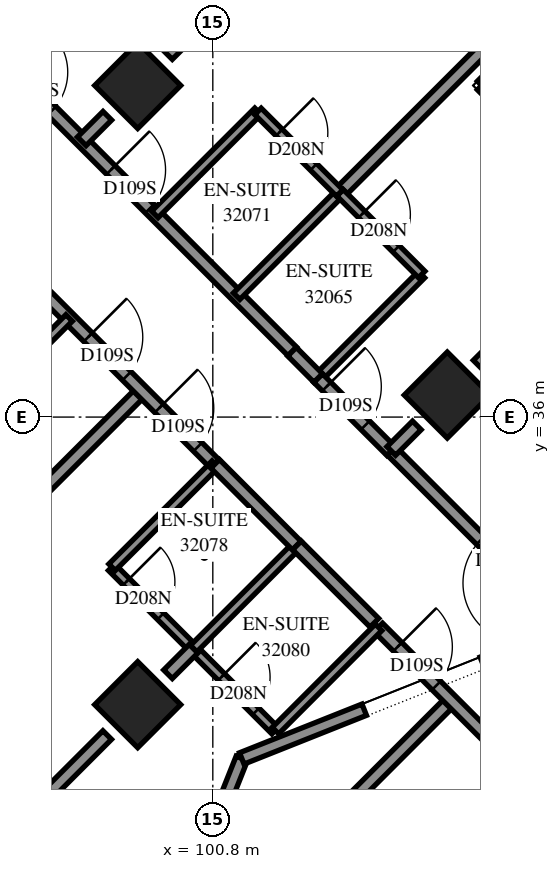
"""IFC4 building model, lengths in metres.
Left out: names, types, materials, properties, quantities, classifications, styles, units other than length and angle.
Written with IfcOpenShell. Run it as: python <this file> out.ifc"""

import sys

from ifc_helpers import new_model, si_unit, direction, frame, frame_2d, origin, origin_2d, place, context, subcontext, project, spatial, polyline, rectangle, outline, extrude, element, fill, save


model = new_model("IFC4")
c1 = context("Model", 3, precision=1e-05, world=origin(), true_north=direction((0.0, 1.0)))
c2 = subcontext(c1, "Body", "Model", "MODEL_VIEW")
j1 = project(units=[si_unit("LENGTHUNIT", "METRE"), si_unit("PLANEANGLEUNIT", "RADIAN")], contexts=[c1])
p1 = place(None, origin())
s1 = spatial("IfcSite", under=j1, at=p1, CompositionType="ELEMENT")
p2 = place(p1, origin())
s2 = spatial("IfcBuilding", under=s1, at=p2, CompositionType="ELEMENT")
p3 = place(p2, frame((0.0, 0.0, 118.6)))
s3 = spatial("IfcBuildingStorey", under=s2, at=p3, CompositionType="ELEMENT", Elevation=118.6)
for number, where, z_axis, x_axis in (
    (1, (99.565, 41.453, 0.0), (0.0, 0.0, 1.0), (0.707, -0.707, 0.0)),
    (2, (104.656, 36.362, 0.0), (0.0, 0.0, 1.0), (0.707, -0.707, 0.0)),
    (3, (99.565, 31.271, 0.0), (0.0, 0.0, 1.0), (0.707, -0.707, 0.0)),
):
    element("IfcColumn", number, at=place(p3, frame(where, z_axis=z_axis, x_axis=x_axis)), inside=s3, PredefinedType="COLUMN", context=c2, shape_type="SweptSolid", body=[
        extrude(rectangle(XDim=1.0, YDim=1.0, at=origin_2d()), origin(), (0.0, 0.0, 1.0), 3.1),
    ])
p4 = place(p3, frame((108.379, 44.61, 0.0), z_axis=(0.0, 0.0, 1.0), x_axis=(-0.7071179789, -0.7070955833, 0.0)))
e4 = element("IfcWall", 4, at=p4, inside=s3, PredefinedType="PARAPET", context=c2, shape_type="SweptSolid", body=[
    extrude(outline(polyline([(0.0, -0.1), (4.565, -0.1), (4.365, 0.1), (0.0, 0.1), (0.0, -0.1)])), origin(), (0.0, 0.0, 1.0), 0.25),
])
p5 = place(p3, frame((105.222, 41.453, 0.0), z_axis=(0.0, 0.0, 1.0), x_axis=(0.7071067812, -0.7071067812, 0.0)))
e5 = element("IfcWall", 5, at=p5, inside=s3, PredefinedType="PARAPET", context=c2, shape_type="SweptSolid", body=[
    extrude(outline(polyline([(-0.1, -0.1), (4.59, -0.1), (4.718, 0.1), (0.1, 0.1), (-0.1, -0.1)])), origin(), (0.0, 0.0, 1.0), 0.25),
])
p6 = place(p3, frame((101.276, 30.386, 0.0), z_axis=(0.0, 0.0, 1.0), x_axis=(-0.3696934536, -0.9291537819, 0.0)))
e6 = element("IfcWall", 6, at=p6, inside=s3, PredefinedType="PARAPET", context=c2, shape_type="SweptSolid", body=[
    extrude(outline(polyline([(-0.043, -0.1), (5.524, -0.1), (5.614, 0.1), (0.043, 0.1), (-0.043, -0.1)])), origin(), (0.0, 0.0, 1.0), 0.25),
])
p7 = place(p3, frame((96.465, 23.082, 0.0), z_axis=(0.0, 0.0, 1.0), x_axis=(0.707016895, 0.7071966559, 0.0)))
e7 = element("IfcWall", 7, at=p7, inside=s3, PredefinedType="PARTITIONING", context=c2, shape_type="SweptSolid", body=[
    extrude(rectangle(XDim=11.682, YDim=0.2, at=frame_2d((5.841, 0.0))), origin(), (0.0, 0.0, 1.0), 3.1),
])
p8 = place(p3, frame((91.45, 28.248, 0.0), z_axis=(0.0, 0.0, 1.0), x_axis=(0.7071931644, 0.7070203875, 0.0)))
e8 = element("IfcWall", 8, at=p8, inside=s3, PredefinedType="PARTITIONING", context=c2, shape_type="SweptSolid", body=[
    extrude(rectangle(XDim=11.576, YDim=0.2, at=frame_2d((5.788, 0.0))), origin(), (0.0, 0.0, 1.0), 3.1),
])
p9 = place(p3, frame((94.047, 42.015, 0.0), z_axis=(0.0, 0.0, 1.0), x_axis=(0.7071067812, -0.7071067812, 0.0)))
e9 = element("IfcWall", 9, at=p9, inside=s3, PredefinedType="PARTITIONING", context=c2, shape_type="SweptSolid", body=[
    extrude(rectangle(XDim=9.6, YDim=0.2, at=frame_2d((4.8, 0.0))), origin(), (0.0, 0.0, 1.0), 3.1),
])
p10 = place(p9, frame((1.099, 0.0, 0.0)))
e10 = element("IfcOpeningElement", 10, at=p10, cuts=e9, PredefinedType="OPENING", context=c2, shape_type="SweptSolid", body=[
    extrude(rectangle(XDim=0.9, YDim=2.1, at=frame_2d((0.45, 1.05))), frame((0.0, 0.11, 0.0), z_axis=(0.0, -1.0, 0.0), x_axis=(1.0, 0.0, 0.0)), (0.0, 0.0, 1.0), 0.22),
])
p11 = place(p9, frame((6.649, 0.0, 0.0)))
e11 = element("IfcOpeningElement", 11, at=p11, cuts=e9, PredefinedType="OPENING", context=c2, shape_type="SweptSolid", body=[
    extrude(rectangle(XDim=0.9, YDim=2.1, at=frame_2d((0.45, 1.05))), frame((0.0, 0.11, 0.0), z_axis=(0.0, -1.0, 0.0), x_axis=(1.0, 0.0, 0.0)), (0.0, 0.0, 1.0), 0.22),
])
p12 = place(p9, frame((8.3, 0.0, 0.0)))
e12 = element("IfcOpeningElement", 12, at=p12, cuts=e9, PredefinedType="OPENING", context=c2, shape_type="SweptSolid", body=[
    extrude(rectangle(XDim=0.9, YDim=2.1, at=frame_2d((0.45, 1.05))), frame((0.0, 0.11, 0.0), z_axis=(0.0, -1.0, 0.0), x_axis=(1.0, 0.0, 0.0)), (0.0, 0.0, 1.0), 0.22),
])
p13 = place(p3, frame((96.103, 43.083, 0.0), z_axis=(0.0, 0.0, 1.0), x_axis=(0.7071067812, -0.7071067812, 0.0)))
e13 = element("IfcWall", 13, at=p13, inside=s3, PredefinedType="PARTITIONING", context=c2, shape_type="SweptSolid", body=[
    extrude(rectangle(XDim=8.491, YDim=0.2, at=frame_2d((4.245, 0.0))), origin(), (0.0, 0.0, 1.0), 3.1),
])
p14 = place(p13, frame((1.995, 0.0, 0.0)))
e14 = element("IfcOpeningElement", 14, at=p14, cuts=e13, PredefinedType="OPENING", context=c2, shape_type="SweptSolid", body=[
    extrude(rectangle(XDim=0.9, YDim=2.1, at=frame_2d((0.45, 1.05))), frame((0.0, 0.11, 0.0), z_axis=(0.0, -1.0, 0.0), x_axis=(1.0, 0.0, 0.0)), (0.0, 0.0, 1.0), 0.22),
])
p15 = place(p13, frame((4.27, 0.0, 0.0)))
e15 = element("IfcOpeningElement", 15, at=p15, cuts=e13, PredefinedType="OPENING", context=c2, shape_type="SweptSolid", body=[
    extrude(rectangle(XDim=0.9, YDim=2.1, at=frame_2d((0.45, 1.05))), frame((0.0, 0.11, 0.0), z_axis=(0.0, -1.0, 0.0), x_axis=(1.0, 0.0, 0.0)), (0.0, 0.0, 1.0), 0.22),
])
p16 = place(p3, frame((102.887, 39.687, 0.0), z_axis=(0.0, 0.0, 1.0), x_axis=(0.707250564, 0.7069629691, 0.0)))
e16 = element("IfcWall", 16, at=p16, inside=s3, PredefinedType="PARTITIONING", context=c2, shape_type="SweptSolid", body=[
    extrude(rectangle(XDim=7.302, YDim=0.2, at=frame_2d((3.651, 0.0))), origin(), (0.0, 0.0, 1.0), 3.1),
])
p17 = place(p3, frame((108.831, 30.355, 0.0), z_axis=(0.0, 0.0, 1.0), x_axis=(-0.7073012053, 0.7069123036, 0.0)))
e17 = element("IfcWall", 17, at=p17, inside=s3, PredefinedType="PARTITIONING", context=c2, shape_type="SweptSolid", body=[
    extrude(rectangle(XDim=7.2, YDim=0.2, at=frame_2d((3.6, 0.0))), origin(), (0.0, 0.0, 1.0), 3.1),
])
p18 = place(p17, frame((4.125, 0.0, 0.0)))
e18 = element("IfcOpeningElement", 18, at=p18, cuts=e17, PredefinedType="OPENING", context=c2, shape_type="SweptSolid", body=[
    extrude(rectangle(XDim=1.0, YDim=2.1, at=frame_2d((0.5, 1.05))), frame((0.0, 0.11, 0.0), z_axis=(0.0, -1.0, 0.0), x_axis=(1.0, 0.0, 0.0)), (0.0, 0.0, 1.0), 0.22),
])
p19 = place(p17, frame((0.705, 0.0, 0.0)))
e19 = element("IfcOpeningElement", 19, at=p19, cuts=e17, PredefinedType="OPENING", context=c2, shape_type="SweptSolid", body=[
    extrude(rectangle(XDim=0.9, YDim=2.1, at=frame_2d((0.45, 1.05))), frame((0.0, 0.11, 0.0), z_axis=(0.0, -1.0, 0.0), x_axis=(1.0, 0.0, 0.0)), (0.0, 0.0, 1.0), 0.22),
])
for number, where, z_axis, x_axis in (
    (20, (105.155, 36.863, 0.0), (0.0, 0.0, 1.0), (0.707, 0.707, 0.0)),
    (21, (100.063, 41.953, 0.0), (0.0, 0.0, 1.0), (0.707, 0.707, 0.0)),
):
    element("IfcWall", number, at=place(p3, frame(where, z_axis=z_axis, x_axis=x_axis)), inside=s3, PredefinedType="PARTITIONING", context=c2, shape_type="SweptSolid", body=[
        extrude(rectangle(XDim=5.787, YDim=0.2, at=frame_2d((2.893, 0.0))), origin(), (0.0, 0.0, 1.0), 3.1),
    ])
p20 = place(p3, frame((94.973, 26.681, 0.0), z_axis=(0.0, 0.0, 1.0), x_axis=(0.7071067812, 0.7071067812, 0.0)))
e22 = element("IfcWall", 22, at=p20, inside=s3, PredefinedType="PARTITIONING", context=c2, shape_type="SweptSolid", body=[
    extrude(rectangle(XDim=5.784, YDim=0.2, at=frame_2d((2.892, 0.0))), origin(), (0.0, 0.0, 1.0), 2.6),
])
p21 = place(p3, frame((103.521, 32.541, 0.0), z_axis=(0.0, 0.0, 1.0), x_axis=(0.7071067812, -0.7071067812, 0.0)))
e23 = element("IfcWall", 23, at=p21, inside=s3, PredefinedType="PARTITIONING", context=c2, shape_type="SweptSolid", body=[
    extrude(rectangle(XDim=5.301, YDim=0.2, at=frame_2d((2.65, 0.0))), origin(), (0.0, 0.0, 1.0), 3.1),
])
p22 = place(p21, frame((0.451, 0.0, 0.0)))
e24 = element("IfcOpeningElement", 24, at=p22, cuts=e23, PredefinedType="OPENING", context=c2, shape_type="SweptSolid", body=[
    extrude(rectangle(XDim=0.9, YDim=2.1, at=frame_2d((0.45, 1.05))), frame((0.0, 0.11, 0.0), z_axis=(0.0, -1.0, 0.0), x_axis=(1.0, 0.0, 0.0)), (0.0, 0.0, 1.0), 0.22),
])
p23 = place(p3, frame((99.137, 33.531, 0.0), z_axis=(0.0, 0.0, 1.0), x_axis=(0.7071067812, -0.7071067812, 0.0)))
e25 = element("IfcWall", 25, at=p23, inside=s3, PredefinedType="PARTITIONING", context=c2, shape_type="SweptSolid", body=[
    extrude(rectangle(XDim=3.801, YDim=0.15, at=frame_2d((1.901, 0.0))), origin(), (0.0, 0.0, 1.0), 3.1),
])
p24 = place(p23, frame((0.339, 0.0, 0.0)))
e26 = element("IfcOpeningElement", 26, at=p24, cuts=e25, PredefinedType="OPENING", context=c2, shape_type="SweptSolid", body=[
    extrude(rectangle(XDim=0.8, YDim=2.1, at=frame_2d((0.4, 1.05))), frame((0.0, 0.085, 0.0), z_axis=(0.0, -1.0, 0.0), x_axis=(1.0, 0.0, 0.0)), (0.0, 0.0, 1.0), 0.17),
])
p25 = place(p23, frame((2.553, 0.0, 0.0)))
e27 = element("IfcOpeningElement", 27, at=p25, cuts=e25, PredefinedType="OPENING", context=c2, shape_type="SweptSolid", body=[
    extrude(rectangle(XDim=0.8, YDim=2.1, at=frame_2d((0.4, 1.05))), frame((0.0, 0.085, 0.0), z_axis=(0.0, -1.0, 0.0), x_axis=(1.0, 0.0, 0.0)), (0.0, 0.0, 1.0), 0.17),
])
p26 = place(p3, frame((102.533, 36.645, 0.0), z_axis=(0.0, 0.0, 1.0), x_axis=(0.7071067812, 0.7071067812, 0.0)))
e28 = element("IfcWall", 28, at=p26, inside=s3, PredefinedType="PARTITIONING", context=c2, shape_type="SweptSolid", body=[
    extrude(rectangle(XDim=2.401, YDim=0.15, at=frame_2d((1.201, 0.0))), origin(), (0.0, 0.0, 1.0), 3.1),
])
for number, where, z_axis, x_axis in (
    (29, (101.192, 37.988, 0.0), (0.0, 0.0, 1.0), (0.707, 0.708, 0.0)),
    (30, (96.739, 35.935, 0.0), (0.0, 0.0, 1.0), (0.708, 0.707, 0.0)),
    (31, (99.143, 33.531, 0.0), (0.0, 0.0, 1.0), (0.708, 0.707, 0.0)),
    (32, (101.83, 30.844, 0.0), (0.0, 0.0, 1.0), (0.707, 0.708, 0.0)),
):
    element("IfcWall", number, at=place(p3, frame(where, z_axis=z_axis, x_axis=x_axis)), inside=s3, PredefinedType="PARTITIONING", context=c2, shape_type="SweptSolid", body=[
        extrude(rectangle(XDim=2.4, YDim=0.15, at=frame_2d((1.2, 0.0))), origin(), (0.0, 0.0, 1.0), 3.1),
    ])
p27 = place(p3, frame((97.443, 41.737, 0.0), z_axis=(0.0, 0.0, 1.0), x_axis=(0.7071067812, 0.7071067812, 0.0)))
e33 = element("IfcWall", 33, at=p27, inside=s3, PredefinedType="PARTITIONING", context=c2, shape_type="SweptSolid", body=[
    extrude(rectangle(XDim=2.398, YDim=0.15, at=frame_2d((1.199, 0.0))), origin(), (0.0, 0.0, 1.0), 3.1),
])
p28 = place(p3, frame((100.483, 32.191, 0.0), z_axis=(0.0, 0.0, 1.0), x_axis=(0.7071067812, 0.7071067812, 0.0)))
e34 = element("IfcWall", 34, at=p28, inside=s3, PredefinedType="PARTITIONING", context=c2, shape_type="SweptSolid", body=[
    extrude(rectangle(XDim=2.398, YDim=0.15, at=frame_2d((1.199, 0.0))), origin(), (0.0, 0.0, 1.0), 2.6),
])
p29 = place(p3, frame((99.847, 39.333, 0.0), z_axis=(0.0, 0.0, 1.0), x_axis=(0.7071067812, 0.7071067812, 0.0)))
e35 = element("IfcWall", 35, at=p29, inside=s3, PredefinedType="PARTITIONING", context=c2, shape_type="SweptSolid", body=[
    extrude(rectangle(XDim=2.398, YDim=0.15, at=frame_2d((1.199, 0.0))), origin(), (0.0, 0.0, 1.0), 3.1),
])
p30 = place(p3, frame((102.891, 39.69, 0.0), z_axis=(0.0, 0.0, 1.0), x_axis=(0.7071067812, -0.7071067812, 0.0)))
e36 = element("IfcWall", 36, at=p30, inside=s3, PredefinedType="PARTITIONING", context=c2, shape_type="SweptSolid", body=[
    extrude(rectangle(XDim=1.901, YDim=0.15, at=frame_2d((0.95, 0.0))), origin(), (0.0, 0.0, 1.0), 3.1),
])
p31 = place(p30, frame((0.505, 0.0, 0.0)))
e37 = element("IfcOpeningElement", 37, at=p31, cuts=e36, PredefinedType="OPENING", context=c2, shape_type="SweptSolid", body=[
    extrude(rectangle(XDim=0.8, YDim=2.1, at=frame_2d((0.4, 1.05))), frame((0.0, 0.085, 0.0), z_axis=(0.0, -1.0, 0.0), x_axis=(1.0, 0.0, 0.0)), (0.0, 0.0, 1.0), 0.17),
])
p32 = place(p3, frame((100.839, 35.231, 0.0), z_axis=(0.0, 0.0, 1.0), x_axis=(0.7065800724, -0.7076330979, 0.0)))
e38 = element("IfcWall", 38, at=p32, inside=s3, PredefinedType="PARTITIONING", context=c2, shape_type="SweptSolid", body=[
    extrude(rectangle(XDim=1.899, YDim=0.2, at=frame_2d((0.95, 0.0))), origin(), (0.0, 0.0, 1.0), 3.1),
])
p33 = place(p3, frame((101.543, 41.027, 0.0), z_axis=(0.0, 0.0, 1.0), x_axis=(0.7076330979, -0.7065800724, 0.0)))
e39 = element("IfcWall", 39, at=p33, inside=s3, PredefinedType="PARTITIONING", context=c2, shape_type="SweptSolid", body=[
    extrude(rectangle(XDim=1.899, YDim=0.15, at=frame_2d((0.95, 0.0))), origin(), (0.0, 0.0, 1.0), 3.1),
])
p34 = place(p33, frame((0.493, 0.0, 0.0)))
e40 = element("IfcOpeningElement", 40, at=p34, cuts=e39, PredefinedType="OPENING", context=c2, shape_type="SweptSolid", body=[
    extrude(rectangle(XDim=0.8, YDim=2.1, at=frame_2d((0.4, 1.05))), frame((0.0, 0.085, 0.0), z_axis=(0.0, -1.0, 0.0), x_axis=(1.0, 0.0, 0.0)), (0.0, 0.0, 1.0), 0.17),
])
p35 = place(p3, frame((102.183, 33.889, 0.0), z_axis=(0.0, 0.0, 1.0), x_axis=(0.7076620277, -0.7065510983, 0.0)))
e41 = element("IfcWall", 41, at=p35, inside=s3, PredefinedType="PARTITIONING", context=c2, shape_type="SweptSolid", body=[
    extrude(rectangle(XDim=1.8, YDim=0.2, at=frame_2d((0.9, 0.0))), origin(), (0.0, 0.0, 1.0), 3.1),
])
p36 = place(p3, frame((102.531, 36.641, 0.0), z_axis=(0.0, 0.0, 1.0), x_axis=(0.7071067812, -0.7071067812, 0.0)))
e42 = element("IfcWall", 42, at=p36, inside=s3, PredefinedType="PARTITIONING", context=c2, shape_type="SweptSolid", body=[
    extrude(rectangle(XDim=1.7, YDim=0.2, at=frame_2d((0.85, 0.0))), origin(), (0.0, 0.0, 1.0), 3.1),
])
p37 = place(p36, frame((0.198, 0.0, 0.0)))
e43 = element("IfcOpeningElement", 43, at=p37, cuts=e42, PredefinedType="OPENING", context=c2, shape_type="SweptSolid", body=[
    extrude(rectangle(XDim=0.9, YDim=2.1, at=frame_2d((0.45, 1.05))), frame((0.0, 0.11, 0.0), z_axis=(0.0, -1.0, 0.0), x_axis=(1.0, 0.0, 0.0)), (0.0, 0.0, 1.0), 0.22),
])
p38 = place(p3, frame((102.103, 37.075, 0.0), z_axis=(0.0, 0.0, 1.0), x_axis=(0.7054642634, -0.7087454925, 0.0)))
e44 = element("IfcWall", 44, at=p38, inside=s3, PredefinedType="PARTITIONING", context=c2, shape_type="SweptSolid", body=[
    extrude(rectangle(XDim=0.61, YDim=0.2, at=frame_2d((0.305, 0.0))), origin(), (0.0, 0.0, 1.0), 3.1),
])
p39 = place(p3, frame((98.645, 40.535, 0.0), z_axis=(0.0, 0.0, 1.0), x_axis=(0.7071067812, 0.7071067812, 0.0)))
e45 = element("IfcWall", 45, at=p39, inside=s3, PredefinedType="PARTITIONING", context=c2, shape_type="SweptSolid", body=[
    extrude(rectangle(XDim=0.594, YDim=0.2, at=frame_2d((0.297, 0.0))), origin(), (0.0, 0.0, 1.0), 3.1),
])
for number, where, z_axis, x_axis in (
    (46, (100.063, 31.771, 0.0), (0.0, 0.0, 1.0), (0.707, 0.707, 0.0)),
    (47, (103.735, 35.443, 0.0), (0.0, 0.0, 1.0), (0.707, 0.707, 0.0)),
):
    element("IfcWall", number, at=place(p3, frame(where, z_axis=z_axis, x_axis=x_axis)), inside=s3, PredefinedType="PARTITIONING", context=c2, shape_type="SweptSolid", body=[
        extrude(rectangle(XDim=0.594, YDim=0.2, at=frame_2d((0.297, 0.0))), origin(), (0.0, 0.0, 1.0), 2.6),
    ])
p40 = place(p3, frame((106.451, 32.445, 0.0), z_axis=(0.0, 0.0, 1.0), x_axis=(-0.9291537049, -0.369693647, 0.0)))
e48 = element("IfcWall", 48, at=p40, inside=s3, PredefinedType="PARAPET", context=c2, shape_type="SweptSolid", body=[
    extrude(outline(polyline([(0.045, -0.1), (1.311, -0.1), (1.311, 0.1), (-0.045, 0.1), (0.045, -0.1)])), origin(), (0.0, 0.0, 1.0), 0.25),
])
p41 = place(p3, frame((103.29, 31.188, 0.0), z_axis=(0.0, 0.0, 1.0), x_axis=(-0.9291561184, -0.3696875811, 0.0)))
e49 = element("IfcWall", 49, at=p41, inside=s3, PredefinedType="PARAPET", context=c2, shape_type="SweptSolid", body=[
    extrude(outline(polyline([(0.0, -0.1), (2.21, -0.1), (2.124, 0.1), (0.0, 0.1), (0.0, -0.1)])), origin(), (0.0, 0.0, 1.0), 0.25),
])
p42 = place(p37, origin())
e50 = element("IfcDoor", 50, at=p42, inside=s3, OperationType="SINGLE_SWING_RIGHT", PredefinedType="DOOR", context=c2, shape_type="SweptSolid", body=[
    extrude(rectangle(XDim=0.9, YDim=2.1, at=frame_2d((0.45, 1.05))), frame((0.0, 0.025, 0.0), z_axis=(0.0, -1.0, 0.0), x_axis=(1.0, 0.0, 0.0)), (0.0, 0.0, 1.0), 0.05),
])
fill(e43, e50)
p43 = place(p31, origin())
e51 = element("IfcDoor", 51, at=p43, inside=s3, OperationType="SINGLE_SWING_RIGHT", PredefinedType="DOOR", context=c2, shape_type="SweptSolid", body=[
    extrude(rectangle(XDim=0.8, YDim=2.1, at=frame_2d((0.4, 1.05))), frame((0.0, 0.025, 0.0), z_axis=(0.0, -1.0, 0.0), x_axis=(1.0, 0.0, 0.0)), (0.0, 0.0, 1.0), 0.05),
])
fill(e37, e51)
p44 = place(p18, origin())
e52 = element("IfcDoor", 52, at=p44, inside=s3, OperationType="SINGLE_SWING_LEFT", PredefinedType="DOOR", context=c2, shape_type="SweptSolid", body=[
    extrude(rectangle(XDim=1.0, YDim=2.1, at=frame_2d((0.5, 1.05))), frame((0.0, 0.025, 0.0), z_axis=(0.0, -1.0, 0.0), x_axis=(1.0, 0.0, 0.0)), (0.0, 0.0, 1.0), 0.05),
])
fill(e18, e52)
p45 = place(p15, origin())
e53 = element("IfcDoor", 53, at=p45, inside=s3, OperationType="SINGLE_SWING_LEFT", PredefinedType="DOOR", context=c2, shape_type="SweptSolid", body=[
    extrude(rectangle(XDim=0.9, YDim=2.1, at=frame_2d((0.45, 1.05))), frame((0.0, 0.025, 0.0), z_axis=(0.0, -1.0, 0.0), x_axis=(1.0, 0.0, 0.0)), (0.0, 0.0, 1.0), 0.05),
])
fill(e15, e53)
p46 = place(p34, origin())
e54 = element("IfcDoor", 54, at=p46, inside=s3, OperationType="SINGLE_SWING_RIGHT", PredefinedType="DOOR", context=c2, shape_type="SweptSolid", body=[
    extrude(rectangle(XDim=0.8, YDim=2.1, at=frame_2d((0.4, 1.05))), frame((0.0, 0.025, 0.0), z_axis=(0.0, -1.0, 0.0), x_axis=(1.0, 0.0, 0.0)), (0.0, 0.0, 1.0), 0.05),
])
fill(e40, e54)
p47 = place(p11, origin())
e55 = element("IfcDoor", 55, at=p47, inside=s3, OperationType="SINGLE_SWING_RIGHT", PredefinedType="DOOR", context=c2, shape_type="SweptSolid", body=[
    extrude(rectangle(XDim=0.9, YDim=2.1, at=frame_2d((0.45, 1.05))), frame((0.0, 0.025, 0.0), z_axis=(0.0, -1.0, 0.0), x_axis=(1.0, 0.0, 0.0)), (0.0, 0.0, 1.0), 0.05),
])
fill(e11, e55)
p48 = place(p12, origin())
e56 = element("IfcDoor", 56, at=p48, inside=s3, OperationType="SINGLE_SWING_LEFT", PredefinedType="DOOR", context=c2, shape_type="SweptSolid", body=[
    extrude(rectangle(XDim=0.9, YDim=2.1, at=frame_2d((0.45, 1.05))), frame((0.0, 0.025, 0.0), z_axis=(0.0, -1.0, 0.0), x_axis=(1.0, 0.0, 0.0)), (0.0, 0.0, 1.0), 0.05),
])
fill(e12, e56)
p49 = place(p24, origin())
e57 = element("IfcDoor", 57, at=p49, inside=s3, OperationType="SINGLE_SWING_RIGHT", PredefinedType="DOOR", context=c2, shape_type="SweptSolid", body=[
    extrude(rectangle(XDim=0.8, YDim=2.1, at=frame_2d((0.4, 1.05))), frame((0.0, 0.025, 0.0), z_axis=(0.0, -1.0, 0.0), x_axis=(1.0, 0.0, 0.0)), (0.0, 0.0, 1.0), 0.05),
])
fill(e26, e57)
p50 = place(p22, origin())
e58 = element("IfcDoor", 58, at=p50, inside=s3, OperationType="SINGLE_SWING_RIGHT", PredefinedType="DOOR", context=c2, shape_type="SweptSolid", body=[
    extrude(rectangle(XDim=0.9, YDim=2.1, at=frame_2d((0.45, 1.05))), frame((0.0, 0.025, 0.0), z_axis=(0.0, -1.0, 0.0), x_axis=(1.0, 0.0, 0.0)), (0.0, 0.0, 1.0), 0.05),
])
fill(e24, e58)
p51 = place(p25, origin())
e59 = element("IfcDoor", 59, at=p51, inside=s3, OperationType="SINGLE_SWING_RIGHT", PredefinedType="DOOR", context=c2, shape_type="SweptSolid", body=[
    extrude(rectangle(XDim=0.8, YDim=2.1, at=frame_2d((0.4, 1.05))), frame((0.0, 0.025, 0.0), z_axis=(0.0, -1.0, 0.0), x_axis=(1.0, 0.0, 0.0)), (0.0, 0.0, 1.0), 0.05),
])
fill(e27, e59)
save(model, sys.argv[1])
